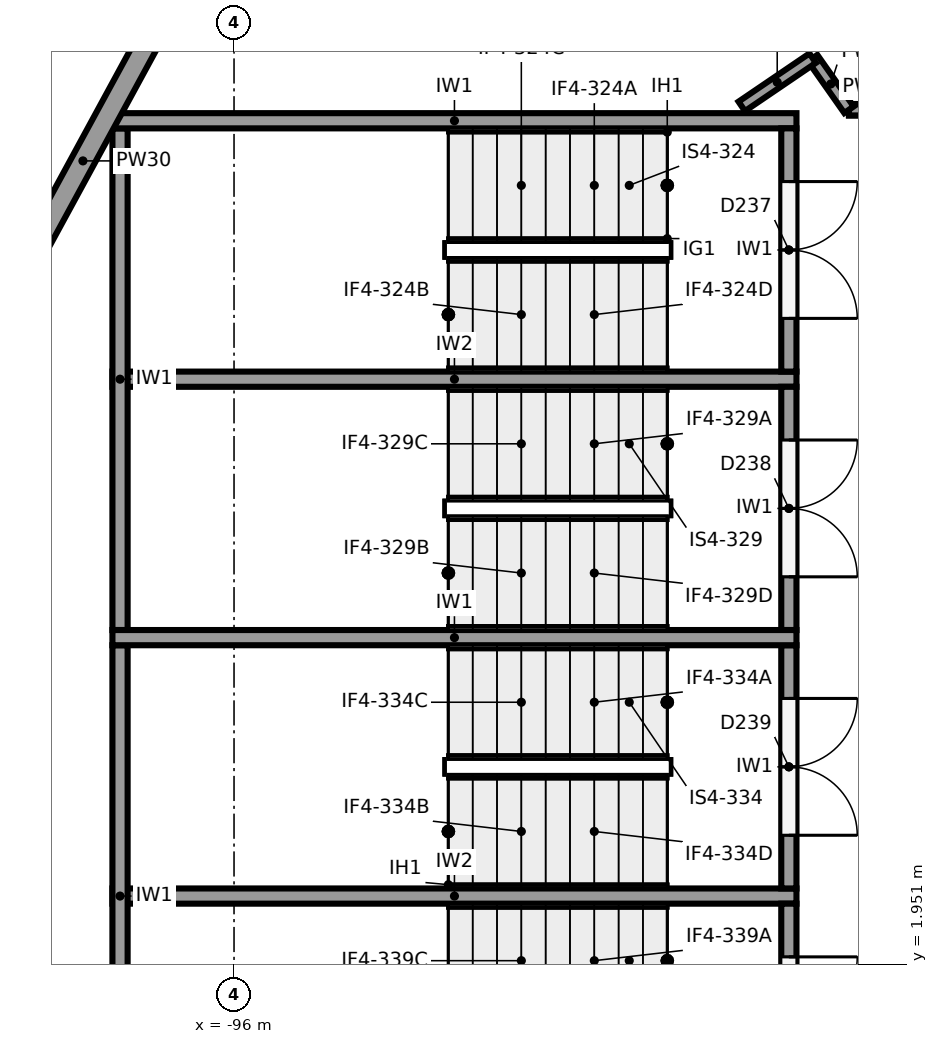
"""IFC4 building model, lengths in metres.
Left out: names, types, materials, properties, quantities, classifications, styles, units other than length and angle.
Written with IfcOpenShell. Run it as: python <this file> out.ifc"""

import sys

from ifc_helpers import new_model, si_unit, direction, frame, frame_2d, origin, place, context, subcontext, project, spatial, rectangle, extrude, element, fill, save


model = new_model("IFC4")
c1 = context("Model", 3, precision=1e-05, world=origin(), true_north=direction((0.0, 1.0)))
c2 = subcontext(c1, "Body", "Model", "MODEL_VIEW")
j1 = project(units=[si_unit("LENGTHUNIT", "METRE"), si_unit("PLANEANGLEUNIT", "RADIAN")], contexts=[c1])
p1 = place(None, origin())
s1 = spatial("IfcSite", under=j1, at=p1, CompositionType="ELEMENT")
p2 = place(p1, origin())
s2 = spatial("IfcBuilding", under=s1, at=p2, CompositionType="ELEMENT")
p3 = place(p2, frame((0.0, 0.0, 12.0)))
s3 = spatial("IfcBuildingStorey", under=s2, at=p3, CompositionType="ELEMENT", Elevation=12.0)
p4 = place(p3, frame((-101.161, 6.689, 0.0), z_axis=(0.0, 0.0, 1.0), x_axis=(0.477867771117, 0.878431780691, 0.0)))
e1 = element("IfcWall", 1, at=p4, inside=s3, PredefinedType="SOLIDWALL", context=c2, shape_type="SweptSolid", body=[
    extrude(rectangle(XDim=13.28, YDim=0.3, at=frame_2d((6.64, 0.0))), origin(), (0.0, 0.0, 1.0), 4.35),
])
p5 = place(p4, frame((9.03, 0.0, 0.0)))
e2 = element("IfcOpeningElement", 2, at=p5, cuts=e1, PredefinedType="OPENING", context=c2, shape_type="SweptSolid", body=[
    extrude(rectangle(XDim=1.8, YDim=2.4, at=frame_2d((0.9, 1.2))), frame((0.0, 0.16, 0.0), z_axis=(0.0, -1.0, 0.0), x_axis=(1.0, 0.0, 0.0)), (0.0, 0.0, 1.0), 0.32),
])
p6 = place(p3, frame((-94.815, -5.855, 0.0), z_axis=(0.0, 0.0, 1.0), x_axis=(-0.477867771117, 0.878431780691, 0.0)))
e3 = element("IfcWall", 3, at=p6, inside=s3, PredefinedType="SOLIDWALL", context=c2, shape_type="SweptSolid", body=[
    extrude(rectangle(XDim=13.28, YDim=0.35, at=frame_2d((6.64, 0.0))), origin(), (0.0, 0.0, 1.0), 4.35),
])
p7 = place(p6, frame((0.75, 0.0, 1.0)))
e4 = element("IfcOpeningElement", 4, at=p7, cuts=e3, PredefinedType="OPENING", context=c2, shape_type="SweptSolid", body=[
    extrude(rectangle(XDim=0.9, YDim=3.25, at=frame_2d((0.45, 1.625))), frame((0.0, 0.185, 0.0), z_axis=(0.0, -1.0, 0.0), x_axis=(1.0, 0.0, 0.0)), (0.0, 0.0, 1.0), 0.37),
])
p8 = place(p6, frame((2.85, 0.0, 1.0)))
e5 = element("IfcOpeningElement", 5, at=p8, cuts=e3, PredefinedType="OPENING", context=c2, shape_type="SweptSolid", body=[
    extrude(rectangle(XDim=0.9, YDim=3.25, at=frame_2d((0.45, 1.625))), frame((0.0, 0.185, 0.0), z_axis=(0.0, -1.0, 0.0), x_axis=(1.0, 0.0, 0.0)), (0.0, 0.0, 1.0), 0.37),
])
p9 = place(p6, frame((11.25, 0.0, 1.0)))
e6 = element("IfcOpeningElement", 6, at=p9, cuts=e3, PredefinedType="OPENING", context=c2, shape_type="SweptSolid", body=[
    extrude(rectangle(XDim=0.9, YDim=3.25, at=frame_2d((0.45, 1.625))), frame((0.0, 0.185, 0.0), z_axis=(0.0, -1.0, 0.0), x_axis=(1.0, 0.0, 0.0)), (0.0, 0.0, 1.0), 0.37),
])
for number, where, z_axis, x_axis in (
    (7, (-97.6, 13.05, 0.0), (0.0, 0.0, 1.0), (1.0, 0.0, 0.0)),
    (8, (-97.6, 6.25, 0.0), (0.0, 0.0, 1.0), (1.0, 0.0, 0.0)),
):
    element("IfcWall", number, at=place(p3, frame(where, z_axis=z_axis, x_axis=x_axis)), inside=s3, PredefinedType="SHEAR", context=c2, shape_type="SweptSolid", body=[
        extrude(rectangle(XDim=9.0, YDim=0.2, at=frame_2d((4.5, 0.0))), origin(), (0.0, 0.0, 1.0), 5.65),
    ])
for number, where, z_axis, x_axis in (
    (9, (-97.5, 12.95, 0.0), (0.0, 0.0, 1.0), (0.0, -1.0, 0.0)),
    (10, (-97.5, 6.15, 0.0), (0.0, 0.0, 1.0), (0.0, -1.0, 0.0)),
):
    element("IfcWall", number, at=place(p3, frame(where, z_axis=z_axis, x_axis=x_axis)), inside=s3, PredefinedType="SHEAR", context=c2, shape_type="SweptSolid", body=[
        extrude(rectangle(XDim=6.6, YDim=0.2, at=frame_2d((3.3, 0.0))), origin(), (0.0, 0.0, 1.0), 5.65),
    ])
for number, where, z_axis, x_axis in (
    (11, (-97.6, 9.65, 0.0), (0.0, 0.0, 1.0), (1.0, 0.0, 0.0)),
    (12, (-97.6, 2.85, 0.0), (0.0, 0.0, 1.0), (1.0, 0.0, 0.0)),
):
    element("IfcWall", number, at=place(p3, frame(where, z_axis=z_axis, x_axis=x_axis)), inside=s3, PredefinedType="SHEAR", context=c2, shape_type="SweptSolid", body=[
        extrude(rectangle(XDim=9.0, YDim=0.2, at=frame_2d((4.5, 0.0))), origin(), (0.0, 0.0, 1.0), 5.65),
    ])
p10 = place(p3, frame((-88.7, 12.95, 0.0), z_axis=(0.0, 0.0, 1.0), x_axis=(0.0, -1.0, 0.0)))
e13 = element("IfcWall", 13, at=p10, inside=s3, PredefinedType="SHEAR", context=c2, shape_type="SweptSolid", body=[
    extrude(rectangle(XDim=3.2, YDim=0.2, at=frame_2d((1.6, 0.0))), origin(), (0.0, 0.0, 1.0), 5.65),
])
p11 = place(p10, frame((0.7, 0.0, 0.0)))
e14 = element("IfcOpeningElement", 14, at=p11, cuts=e13, PredefinedType="OPENING", context=c2, shape_type="SweptSolid", body=[
    extrude(rectangle(XDim=1.8, YDim=2.1, at=frame_2d((0.9, 1.05))), frame((0.0, 0.11, 0.0), z_axis=(0.0, -1.0, 0.0), x_axis=(1.0, 0.0, 0.0)), (0.0, 0.0, 1.0), 0.22),
])
p12 = place(p3, frame((-88.7, 9.55, 0.0), z_axis=(0.0, 0.0, 1.0), x_axis=(0.0, -1.0, 0.0)))
e15 = element("IfcWall", 15, at=p12, inside=s3, PredefinedType="SHEAR", context=c2, shape_type="SweptSolid", body=[
    extrude(rectangle(XDim=3.2, YDim=0.2, at=frame_2d((1.6, 0.0))), origin(), (0.0, 0.0, 1.0), 5.65),
])
p13 = place(p12, frame((0.7, 0.0, 0.0)))
e16 = element("IfcOpeningElement", 16, at=p13, cuts=e15, PredefinedType="OPENING", context=c2, shape_type="SweptSolid", body=[
    extrude(rectangle(XDim=1.8, YDim=2.1, at=frame_2d((0.9, 1.05))), frame((0.0, 0.11, 0.0), z_axis=(0.0, -1.0, 0.0), x_axis=(1.0, 0.0, 0.0)), (0.0, 0.0, 1.0), 0.22),
])
p14 = place(p3, frame((-88.7, 6.15, 0.0), z_axis=(0.0, 0.0, 1.0), x_axis=(0.0, -1.0, 0.0)))
e17 = element("IfcWall", 17, at=p14, inside=s3, PredefinedType="SHEAR", context=c2, shape_type="SweptSolid", body=[
    extrude(rectangle(XDim=3.2, YDim=0.2, at=frame_2d((1.6, 0.0))), origin(), (0.0, 0.0, 1.0), 5.65),
])
p15 = place(p14, frame((0.7, 0.0, 0.0)))
e18 = element("IfcOpeningElement", 18, at=p15, cuts=e17, PredefinedType="OPENING", context=c2, shape_type="SweptSolid", body=[
    extrude(rectangle(XDim=1.8, YDim=2.1, at=frame_2d((0.9, 1.05))), frame((0.0, 0.11, 0.0), z_axis=(0.0, -1.0, 0.0), x_axis=(1.0, 0.0, 0.0)), (0.0, 0.0, 1.0), 0.22),
])
p16 = place(p3, frame((-88.7, 2.75, 0.0), z_axis=(0.0, 0.0, 1.0), x_axis=(0.0, -1.0, 0.0)))
e19 = element("IfcWall", 19, at=p16, inside=s3, PredefinedType="SHEAR", context=c2, shape_type="SweptSolid", body=[
    extrude(rectangle(XDim=3.2, YDim=0.2, at=frame_2d((1.6, 0.0))), origin(), (0.0, 0.0, 1.0), 5.65),
])
p17 = place(p16, frame((0.7, 0.0, 0.0)))
e20 = element("IfcOpeningElement", 20, at=p17, cuts=e19, PredefinedType="OPENING", context=c2, shape_type="SweptSolid", body=[
    extrude(rectangle(XDim=1.8, YDim=2.1, at=frame_2d((0.9, 1.05))), frame((0.0, 0.11, 0.0), z_axis=(0.0, -1.0, 0.0), x_axis=(1.0, 0.0, 0.0)), (0.0, 0.0, 1.0), 0.22),
])
p18 = place(p3, frame((-81.555, 13.195, 0.0), z_axis=(0.0, 0.0, 1.0), x_axis=(-1.0, 0.0, 0.0)))
e21 = element("IfcWall", 21, at=p18, inside=s3, PredefinedType="PARTITIONING", context=c2, shape_type="SweptSolid", body=[
    extrude(rectangle(XDim=6.354, YDim=0.15, at=frame_2d((3.177, 0.0))), origin(), (0.0, 0.0, 1.0), 4.55),
])
p19 = place(p18, frame((3.85, 0.0, 0.0)))
e22 = element("IfcOpeningElement", 22, at=p19, cuts=e21, PredefinedType="OPENING", context=c2, shape_type="SweptSolid", body=[
    extrude(rectangle(XDim=1.8, YDim=2.1, at=frame_2d((0.9, 1.05))), frame((0.0, 0.085, 0.0), z_axis=(0.0, -1.0, 0.0), x_axis=(1.0, 0.0, 0.0)), (0.0, 0.0, 1.0), 0.17),
])
p20 = place(p3, frame((-87.255, 13.195, 4.55), z_axis=(0.0, 0.0, 1.0), x_axis=(-1.0, 0.0, 0.0)))
e23 = element("IfcWall", 23, at=p20, inside=s3, PredefinedType="PARTITIONING", context=c2, shape_type="SweptSolid", body=[
    extrude(rectangle(XDim=0.654, YDim=0.15, at=frame_2d((0.327, 0.0))), origin(), (0.0, 0.0, 1.0), 1.1),
])
p21 = place(p3, frame((-87.909, 13.195, 0.0), z_axis=(0.0, 0.0, 1.0), x_axis=(-0.575573582652, 0.81774999294, 0.0)))
e24 = element("IfcWall", 24, at=p21, inside=s3, PredefinedType="PARTITIONING", context=c2, shape_type="SweptSolid", body=[
    extrude(rectangle(XDim=0.83, YDim=0.15, at=frame_2d((0.415, 0.0))), origin(), (0.0, 0.0, 1.0), 5.65),
])
p22 = place(p3, frame((-88.387, 13.874, 0.0), z_axis=(0.0, 0.0, 1.0), x_axis=(-0.827055308354, -0.562120553728, 0.0)))
e25 = element("IfcWall", 25, at=p22, inside=s3, PredefinedType="PARTITIONING", context=c2, shape_type="SweptSolid", body=[
    extrude(rectangle(XDim=1.128, YDim=0.15, at=frame_2d((0.564, 0.0))), origin(), (0.0, 0.0, 1.0), 5.65),
])
p23 = place(p11, origin())
e26 = element("IfcDoor", 26, at=p23, inside=s3, OperationType="DOUBLE_DOOR_SINGLE_SWING", PredefinedType="DOOR", context=c2, shape_type="SweptSolid", body=[
    extrude(rectangle(XDim=1.8, YDim=2.1, at=frame_2d((0.9, 1.05))), frame((0.0, 0.025, 0.0), z_axis=(0.0, -1.0, 0.0), x_axis=(1.0, 0.0, 0.0)), (0.0, 0.0, 1.0), 0.05),
])
fill(e14, e26)
p24 = place(p13, origin())
e27 = element("IfcDoor", 27, at=p24, inside=s3, OperationType="DOUBLE_DOOR_SINGLE_SWING", PredefinedType="DOOR", context=c2, shape_type="SweptSolid", body=[
    extrude(rectangle(XDim=1.8, YDim=2.1, at=frame_2d((0.9, 1.05))), frame((0.0, 0.025, 0.0), z_axis=(0.0, -1.0, 0.0), x_axis=(1.0, 0.0, 0.0)), (0.0, 0.0, 1.0), 0.05),
])
fill(e16, e27)
p25 = place(p15, origin())
e28 = element("IfcDoor", 28, at=p25, inside=s3, OperationType="DOUBLE_DOOR_SINGLE_SWING", PredefinedType="DOOR", context=c2, shape_type="SweptSolid", body=[
    extrude(rectangle(XDim=1.8, YDim=2.1, at=frame_2d((0.9, 1.05))), frame((0.0, 0.025, 0.0), z_axis=(0.0, -1.0, 0.0), x_axis=(1.0, 0.0, 0.0)), (0.0, 0.0, 1.0), 0.05),
])
fill(e18, e28)
p26 = place(p17, origin())
e29 = element("IfcDoor", 29, at=p26, inside=s3, OperationType="DOUBLE_DOOR_SINGLE_SWING", PredefinedType="DOOR", context=c2, shape_type="SweptSolid", body=[
    extrude(rectangle(XDim=1.8, YDim=2.1, at=frame_2d((0.9, 1.05))), frame((0.0, 0.025, 0.0), z_axis=(0.0, -1.0, 0.0), x_axis=(1.0, 0.0, 0.0)), (0.0, 0.0, 1.0), 0.05),
])
fill(e20, e29)
save(model, sys.argv[1])
